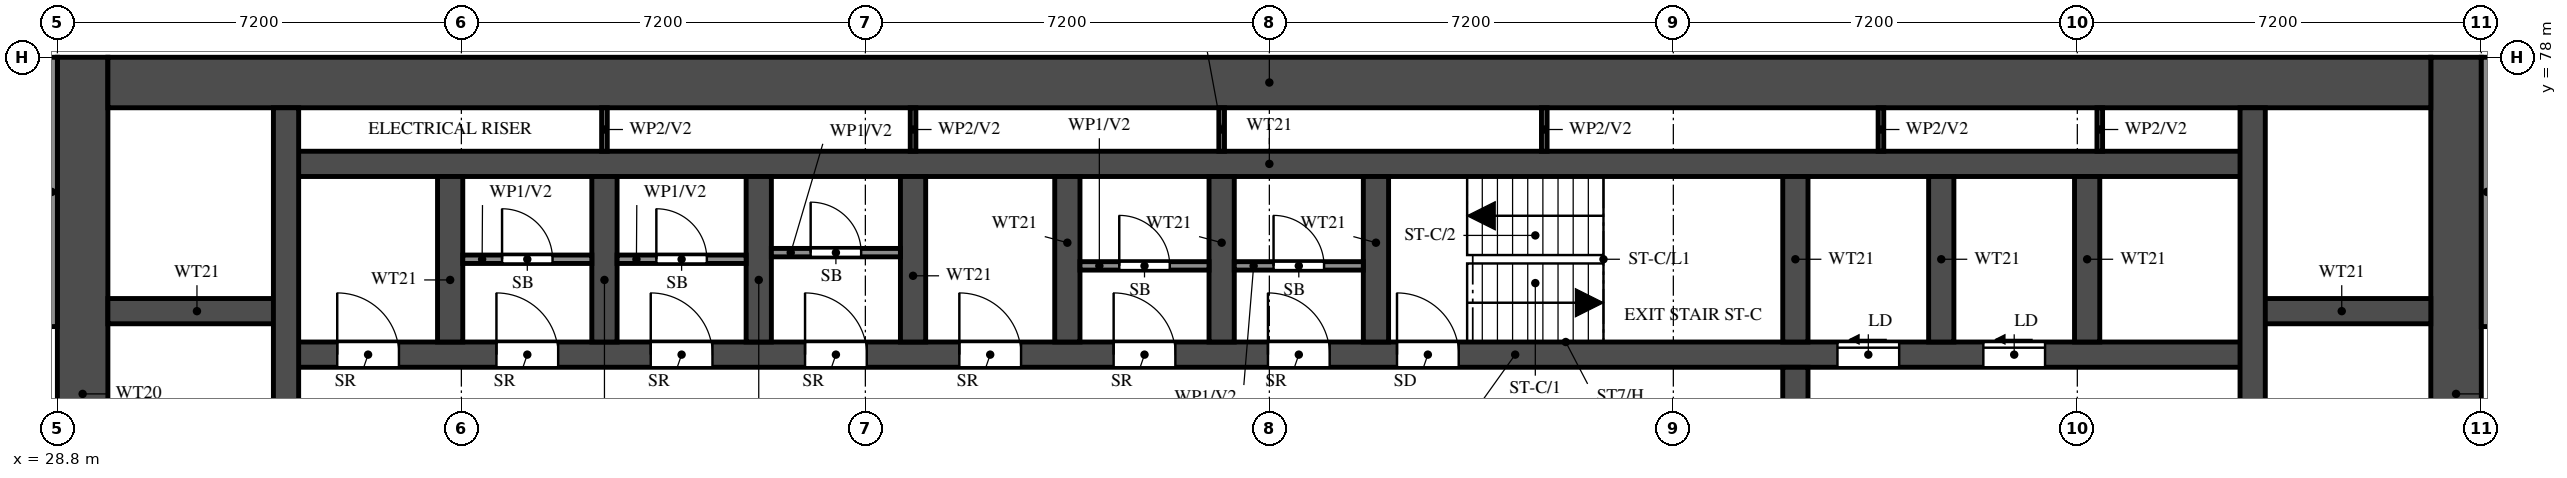
"""IFC4 building model, lengths in metres.
Left out: names, types, materials, properties, quantities, classifications, styles, units other than length and angle.
Written with IfcOpenShell. Run it as: python <this file> out.ifc"""

import sys

from ifc_helpers import new_model, si_unit, direction, frame, frame_2d, origin, place, context, subcontext, project, spatial, rectangle, extrude, element, fill, save


model = new_model("IFC4")
c1 = context("Model", 3, precision=1e-05, world=origin(), true_north=direction((0.0, 1.0)))
c2 = subcontext(c1, "Body", "Model", "MODEL_VIEW")
j1 = project(units=[si_unit("LENGTHUNIT", "METRE"), si_unit("PLANEANGLEUNIT", "RADIAN")], contexts=[c1])
p1 = place(None, origin())
s1 = spatial("IfcSite", under=j1, at=p1, CompositionType="ELEMENT")
p2 = place(p1, origin())
s2 = spatial("IfcBuilding", under=s1, at=p2, CompositionType="ELEMENT")
p3 = place(p2, frame((0.0, 0.0, 93.5)))
s3 = spatial("IfcBuildingStorey", under=s2, at=p3, CompositionType="ELEMENT", Elevation=93.5)
for number, where, z_axis, x_axis in (
    (1, (29.25, 66.0, 0.0), (0.0, 0.0, 1.0), (0.0, 1.0, 0.0)),
    (2, (71.55, 66.0, 0.0), (0.0, 0.0, 1.0), (0.0, 1.0, 0.0)),
):
    element("IfcWall", number, at=place(p3, frame(where, z_axis=z_axis, x_axis=x_axis)), inside=s3, PredefinedType="SHEAR", context=c2, shape_type="SweptSolid", body=[
        extrude(rectangle(XDim=12.0, YDim=0.9, at=frame_2d((6.0, 0.0))), origin(), (0.0, 0.0, 1.0), 3.18),
    ])
p4 = place(p3, frame((29.7, 77.55, 0.0), z_axis=(0.0, 0.0, 1.0), x_axis=(1.0, 0.0, 0.0)))
e3 = element("IfcWall", 3, at=p4, inside=s3, PredefinedType="SHEAR", context=c2, shape_type="SweptSolid", body=[
    extrude(rectangle(XDim=41.4, YDim=0.9, at=frame_2d((20.7, 0.0))), origin(), (0.0, 0.0, 1.0), 3.18),
])
p5 = place(p3, frame((32.875, 72.7, 0.0), z_axis=(0.0, 0.0, 1.0), x_axis=(1.0, 0.0, 0.0)))
e4 = element("IfcWall", 4, at=p5, inside=s3, PredefinedType="SHEAR", context=c2, shape_type="SweptSolid", body=[
    extrude(rectangle(XDim=35.05, YDim=0.45, at=frame_2d((17.525, 0.0))), origin(), (0.0, 0.0, 1.0), 3.18),
])
p6 = place(p5, frame((19.8, 0.0, 0.0)))
e5 = element("IfcOpeningElement", 5, at=p6, cuts=e4, PredefinedType="OPENING", context=c2, shape_type="SweptSolid", body=[
    extrude(rectangle(XDim=1.1, YDim=2.1, at=frame_2d((0.55, 1.05))), frame((0.0, 0.235, 0.0), z_axis=(0.0, -1.0, 0.0), x_axis=(1.0, 0.0, 0.0)), (0.0, 0.0, 1.0), 0.47),
])
p7 = place(p5, frame((27.65, 0.0, 0.0)))
e6 = element("IfcOpeningElement", 6, at=p7, cuts=e4, PredefinedType="OPENING", context=c2, shape_type="SweptSolid", body=[
    extrude(rectangle(XDim=1.1, YDim=2.1, at=frame_2d((0.55, 1.05))), frame((0.0, 0.235, 0.0), z_axis=(0.0, -1.0, 0.0), x_axis=(1.0, 0.0, 0.0)), (0.0, 0.0, 1.0), 0.47),
])
p8 = place(p5, frame((30.25, 0.0, 0.0)))
e7 = element("IfcOpeningElement", 7, at=p8, cuts=e4, PredefinedType="OPENING", context=c2, shape_type="SweptSolid", body=[
    extrude(rectangle(XDim=1.1, YDim=2.1, at=frame_2d((0.55, 1.05))), frame((0.0, 0.235, 0.0), z_axis=(0.0, -1.0, 0.0), x_axis=(1.0, 0.0, 0.0)), (0.0, 0.0, 1.0), 0.47),
])
p9 = place(p5, frame((3.75, 0.0, 0.0)))
e8 = element("IfcOpeningElement", 8, at=p9, cuts=e4, PredefinedType="OPENING", context=c2, shape_type="SweptSolid", body=[
    extrude(rectangle(XDim=1.1, YDim=2.1, at=frame_2d((0.55, 1.05))), frame((0.0, 0.235, 0.0), z_axis=(0.0, -1.0, 0.0), x_axis=(1.0, 0.0, 0.0)), (0.0, 0.0, 1.0), 0.47),
])
p10 = place(p5, frame((6.5, 0.0, 0.0)))
e9 = element("IfcOpeningElement", 9, at=p10, cuts=e4, PredefinedType="OPENING", context=c2, shape_type="SweptSolid", body=[
    extrude(rectangle(XDim=1.1, YDim=2.1, at=frame_2d((0.55, 1.05))), frame((0.0, 0.235, 0.0), z_axis=(0.0, -1.0, 0.0), x_axis=(1.0, 0.0, 0.0)), (0.0, 0.0, 1.0), 0.47),
])
p11 = place(p5, frame((9.25, 0.0, 0.0)))
e10 = element("IfcOpeningElement", 10, at=p11, cuts=e4, PredefinedType="OPENING", context=c2, shape_type="SweptSolid", body=[
    extrude(rectangle(XDim=1.1, YDim=2.1, at=frame_2d((0.55, 1.05))), frame((0.0, 0.235, 0.0), z_axis=(0.0, -1.0, 0.0), x_axis=(1.0, 0.0, 0.0)), (0.0, 0.0, 1.0), 0.47),
])
p12 = place(p5, frame((12.0, 0.0, 0.0)))
e11 = element("IfcOpeningElement", 11, at=p12, cuts=e4, PredefinedType="OPENING", context=c2, shape_type="SweptSolid", body=[
    extrude(rectangle(XDim=1.1, YDim=2.1, at=frame_2d((0.55, 1.05))), frame((0.0, 0.235, 0.0), z_axis=(0.0, -1.0, 0.0), x_axis=(1.0, 0.0, 0.0)), (0.0, 0.0, 1.0), 0.47),
])
p13 = place(p5, frame((14.75, 0.0, 0.0)))
e12 = element("IfcOpeningElement", 12, at=p13, cuts=e4, PredefinedType="OPENING", context=c2, shape_type="SweptSolid", body=[
    extrude(rectangle(XDim=1.1, YDim=2.1, at=frame_2d((0.55, 1.05))), frame((0.0, 0.235, 0.0), z_axis=(0.0, -1.0, 0.0), x_axis=(1.0, 0.0, 0.0)), (0.0, 0.0, 1.0), 0.47),
])
p14 = place(p5, frame((17.5, 0.0, 0.0)))
e13 = element("IfcOpeningElement", 13, at=p14, cuts=e4, PredefinedType="OPENING", context=c2, shape_type="SweptSolid", body=[
    extrude(rectangle(XDim=1.1, YDim=2.1, at=frame_2d((0.55, 1.05))), frame((0.0, 0.235, 0.0), z_axis=(0.0, -1.0, 0.0), x_axis=(1.0, 0.0, 0.0)), (0.0, 0.0, 1.0), 0.47),
])
p15 = place(p5, frame((0.913, 0.0, 0.0)))
e14 = element("IfcOpeningElement", 14, at=p15, cuts=e4, PredefinedType="OPENING", context=c2, shape_type="SweptSolid", body=[
    extrude(rectangle(XDim=1.1, YDim=2.1, at=frame_2d((0.55, 1.05))), frame((0.0, 0.235, 0.0), z_axis=(0.0, -1.0, 0.0), x_axis=(1.0, 0.0, 0.0)), (0.0, 0.0, 1.0), 0.47),
])
p16 = place(p3, frame((32.875, 76.1, 0.0), z_axis=(0.0, 0.0, 1.0), x_axis=(1.0, 0.0, 0.0)))
e15 = element("IfcWall", 15, at=p16, inside=s3, PredefinedType="SHEAR", context=c2, shape_type="SweptSolid", body=[
    extrude(rectangle(XDim=35.05, YDim=0.45, at=frame_2d((17.525, 0.0))), origin(), (0.0, 0.0, 1.0), 3.18),
])
for number, where, z_axis, x_axis in (
    (16, (29.7, 73.475, 0.0), (0.0, 0.0, 1.0), (1.0, 0.0, 0.0)),
    (17, (67.925, 73.475, 0.0), (0.0, 0.0, 1.0), (1.0, 0.0, 0.0)),
):
    element("IfcWall", number, at=place(p3, frame(where, z_axis=z_axis, x_axis=x_axis)), inside=s3, PredefinedType="SHEAR", context=c2, shape_type="SweptSolid", body=[
        extrude(rectangle(XDim=3.175, YDim=0.45, at=frame_2d((1.587, 0.0))), origin(), (0.0, 0.0, 1.0), 3.18),
    ])
p17 = place(p3, frame((32.875, 66.45, 0.0), z_axis=(0.0, 0.0, 1.0), x_axis=(0.0, 1.0, 0.0)))
e18 = element("IfcWall", 18, at=p17, inside=s3, PredefinedType="SHEAR", context=c2, shape_type="SweptSolid", body=[
    extrude(rectangle(XDim=10.65, YDim=0.45, at=frame_2d((5.325, 0.0))), origin(), (0.0, 0.0, 1.0), 3.18),
])
p18 = place(p3, frame((67.925, 66.45, 0.0), z_axis=(0.0, 0.0, 1.0), x_axis=(0.0, 1.0, 0.0)))
e19 = element("IfcWall", 19, at=p18, inside=s3, PredefinedType="SHEAR", context=c2, shape_type="SweptSolid", body=[
    extrude(rectangle(XDim=10.65, YDim=0.45, at=frame_2d((5.325, 0.0))), origin(), (0.0, 0.0, 1.0), 3.18),
])
p19 = place(p18, frame((0.15, 0.0, 0.0)))
e20 = element("IfcOpeningElement", 20, at=p19, cuts=e19, PredefinedType="OPENING", context=c2, shape_type="SweptSolid", body=[
    extrude(rectangle(XDim=1.1, YDim=2.1, at=frame_2d((0.55, 1.05))), frame((0.0, 0.235, 0.0), z_axis=(0.0, -1.0, 0.0), x_axis=(1.0, 0.0, 0.0)), (0.0, 0.0, 1.0), 0.47),
])
p20 = place(p3, frame((59.775, 66.45, 0.0), z_axis=(0.0, 0.0, 1.0), x_axis=(0.0, 1.0, 0.0)))
e21 = element("IfcWall", 21, at=p20, inside=s3, PredefinedType="SHEAR", context=c2, shape_type="SweptSolid", body=[
    extrude(rectangle(XDim=6.025, YDim=0.45, at=frame_2d((3.013, 0.0))), origin(), (0.0, 0.0, 1.0), 3.18),
])
p21 = place(p20, frame((3.85, 0.0, 0.0)))
e22 = element("IfcOpeningElement", 22, at=p21, cuts=e21, PredefinedType="OPENING", context=c2, shape_type="SweptSolid", body=[
    extrude(rectangle(XDim=1.2, YDim=2.1, at=frame_2d((0.6, 1.05))), frame((0.0, 0.235, 0.0), z_axis=(0.0, -1.0, 0.0), x_axis=(1.0, 0.0, 0.0)), (0.0, 0.0, 1.0), 0.47),
])
for number, where, z_axis, x_axis in (
    (23, (59.775, 72.925, 0.0), (0.0, 0.0, 1.0), (0.0, 1.0, 0.0)),
    (24, (35.8, 72.925, 0.0), (0.0, 0.0, 1.0), (0.0, 1.0, 0.0)),
    (25, (38.55, 72.925, 0.0), (0.0, 0.0, 1.0), (0.0, 1.0, 0.0)),
    (26, (41.3, 72.925, 0.0), (0.0, 0.0, 1.0), (0.0, 1.0, 0.0)),
    (27, (44.05, 72.925, 0.0), (0.0, 0.0, 1.0), (0.0, 1.0, 0.0)),
    (28, (46.8, 72.925, 0.0), (0.0, 0.0, 1.0), (0.0, 1.0, 0.0)),
    (29, (49.55, 72.925, 0.0), (0.0, 0.0, 1.0), (0.0, 1.0, 0.0)),
    (30, (52.3, 72.925, 0.0), (0.0, 0.0, 1.0), (0.0, 1.0, 0.0)),
    (31, (62.375, 72.925, 0.0), (0.0, 0.0, 1.0), (0.0, 1.0, 0.0)),
    (32, (64.975, 72.925, 0.0), (0.0, 0.0, 1.0), (0.0, 1.0, 0.0)),
):
    element("IfcWall", number, at=place(p3, frame(where, z_axis=z_axis, x_axis=x_axis)), inside=s3, PredefinedType="SHEAR", context=c2, shape_type="SweptSolid", body=[
        extrude(rectangle(XDim=2.95, YDim=0.45, at=frame_2d((1.475, 0.0))), origin(), (0.0, 0.0, 1.0), 3.18),
    ])
p22 = place(p3, frame((36.025, 74.4, 0.0), z_axis=(0.0, 0.0, 1.0), x_axis=(1.0, 0.0, 0.0)))
e33 = element("IfcWall", 33, at=p22, inside=s3, PredefinedType="PARTITIONING", context=c2, shape_type="SweptSolid", body=[
    extrude(rectangle(XDim=2.3, YDim=0.15, at=frame_2d((1.15, 0.0))), origin(), (0.0, 0.0, 1.0), 3.18),
])
p23 = place(p22, frame((0.7, 0.0, 0.0)))
e34 = element("IfcOpeningElement", 34, at=p23, cuts=e33, PredefinedType="OPENING", context=c2, shape_type="SweptSolid", body=[
    extrude(rectangle(XDim=0.9, YDim=2.1, at=frame_2d((0.45, 1.05))), frame((0.0, 0.085, 0.0), z_axis=(0.0, -1.0, 0.0), x_axis=(1.0, 0.0, 0.0)), (0.0, 0.0, 1.0), 0.17),
])
p24 = place(p3, frame((38.775, 74.4, 0.0), z_axis=(0.0, 0.0, 1.0), x_axis=(1.0, 0.0, 0.0)))
e35 = element("IfcWall", 35, at=p24, inside=s3, PredefinedType="PARTITIONING", context=c2, shape_type="SweptSolid", body=[
    extrude(rectangle(XDim=2.3, YDim=0.15, at=frame_2d((1.15, 0.0))), origin(), (0.0, 0.0, 1.0), 3.18),
])
p25 = place(p24, frame((0.7, 0.0, 0.0)))
e36 = element("IfcOpeningElement", 36, at=p25, cuts=e35, PredefinedType="OPENING", context=c2, shape_type="SweptSolid", body=[
    extrude(rectangle(XDim=0.9, YDim=2.1, at=frame_2d((0.45, 1.05))), frame((0.0, 0.085, 0.0), z_axis=(0.0, -1.0, 0.0), x_axis=(1.0, 0.0, 0.0)), (0.0, 0.0, 1.0), 0.17),
])
p26 = place(p3, frame((41.525, 74.518, 0.0), z_axis=(0.0, 0.0, 1.0), x_axis=(1.0, 0.0, 0.0)))
e37 = element("IfcWall", 37, at=p26, inside=s3, PredefinedType="PARTITIONING", context=c2, shape_type="SweptSolid", body=[
    extrude(rectangle(XDim=2.3, YDim=0.15, at=frame_2d((1.15, 0.0))), origin(), (0.0, 0.0, 1.0), 3.18),
])
p27 = place(p26, frame((0.7, 0.0, 0.0)))
e38 = element("IfcOpeningElement", 38, at=p27, cuts=e37, PredefinedType="OPENING", context=c2, shape_type="SweptSolid", body=[
    extrude(rectangle(XDim=0.9, YDim=2.1, at=frame_2d((0.45, 1.05))), frame((0.0, 0.085, 0.0), z_axis=(0.0, -1.0, 0.0), x_axis=(1.0, 0.0, 0.0)), (0.0, 0.0, 1.0), 0.17),
])
p28 = place(p3, frame((47.025, 74.282, 0.0), z_axis=(0.0, 0.0, 1.0), x_axis=(1.0, 0.0, 0.0)))
e39 = element("IfcWall", 39, at=p28, inside=s3, PredefinedType="PARTITIONING", context=c2, shape_type="SweptSolid", body=[
    extrude(rectangle(XDim=2.3, YDim=0.15, at=frame_2d((1.15, 0.0))), origin(), (0.0, 0.0, 1.0), 3.18),
])
p29 = place(p28, frame((0.7, 0.0, 0.0)))
e40 = element("IfcOpeningElement", 40, at=p29, cuts=e39, PredefinedType="OPENING", context=c2, shape_type="SweptSolid", body=[
    extrude(rectangle(XDim=0.9, YDim=2.1, at=frame_2d((0.45, 1.05))), frame((0.0, 0.085, 0.0), z_axis=(0.0, -1.0, 0.0), x_axis=(1.0, 0.0, 0.0)), (0.0, 0.0, 1.0), 0.17),
])
p30 = place(p3, frame((49.775, 74.282, 0.0), z_axis=(0.0, 0.0, 1.0), x_axis=(1.0, 0.0, 0.0)))
e41 = element("IfcWall", 41, at=p30, inside=s3, PredefinedType="PARTITIONING", context=c2, shape_type="SweptSolid", body=[
    extrude(rectangle(XDim=2.3, YDim=0.15, at=frame_2d((1.15, 0.0))), origin(), (0.0, 0.0, 1.0), 3.18),
])
p31 = place(p30, frame((0.7, 0.0, 0.0)))
e42 = element("IfcOpeningElement", 42, at=p31, cuts=e41, PredefinedType="OPENING", context=c2, shape_type="SweptSolid", body=[
    extrude(rectangle(XDim=0.9, YDim=2.1, at=frame_2d((0.45, 1.05))), frame((0.0, 0.085, 0.0), z_axis=(0.0, -1.0, 0.0), x_axis=(1.0, 0.0, 0.0)), (0.0, 0.0, 1.0), 0.17),
])
for number, where, z_axis, x_axis in (
    (43, (38.55, 76.325, 0.0), (0.0, 0.0, 1.0), (0.0, 1.0, 0.0)),
    (44, (44.05, 76.325, 0.0), (0.0, 0.0, 1.0), (0.0, 1.0, 0.0)),
    (45, (49.55, 76.325, 0.0), (0.0, 0.0, 1.0), (0.0, 1.0, 0.0)),
    (46, (55.3, 76.325, 0.0), (0.0, 0.0, 1.0), (0.0, 1.0, 0.0)),
    (47, (61.3, 76.325, 0.0), (0.0, 0.0, 1.0), (0.0, 1.0, 0.0)),
    (48, (65.2, 76.325, 0.0), (0.0, 0.0, 1.0), (0.0, 1.0, 0.0)),
):
    element("IfcWall", number, at=place(p3, frame(where, z_axis=z_axis, x_axis=x_axis)), inside=s3, PredefinedType="PARTITIONING", context=c2, shape_type="SweptSolid", body=[
        extrude(rectangle(XDim=0.775, YDim=0.1, at=frame_2d((0.388, 0.0))), origin(), (0.0, 0.0, 1.0), 3.18),
    ])
for number, where, z_axis, x_axis in (
    (49, (28.7, 73.2, 0.0), (0.0, 0.0, 1.0), (0.0, 1.0, 0.0)),
    (50, (72.1, 73.2, 0.0), (0.0, 0.0, 1.0), (0.0, 1.0, 0.0)),
):
    element("IfcWall", number, at=place(p3, frame(where, z_axis=z_axis, x_axis=x_axis)), inside=s3, PredefinedType="SOLIDWALL", context=c2, shape_type="SweptSolid", body=[
        extrude(rectangle(XDim=4.8, YDim=0.2, at=frame_2d((2.4, 0.0))), origin(), (0.0, 0.0, 1.0), 3.18),
    ])
p32 = place(p6, origin())
e51 = element("IfcDoor", 51, at=p32, inside=s3, OperationType="SINGLE_SWING_LEFT", PredefinedType="DOOR", context=c2, shape_type="SweptSolid", body=[
    extrude(rectangle(XDim=1.1, YDim=2.1, at=frame_2d((0.55, 1.05))), frame((0.0, 0.025, 0.0), z_axis=(0.0, -1.0, 0.0), x_axis=(1.0, 0.0, 0.0)), (0.0, 0.0, 1.0), 0.05),
])
fill(e5, e51)
p33 = place(p7, origin())
e52 = element("IfcDoor", 52, at=p33, inside=s3, OperationType="SLIDING_TO_LEFT", PredefinedType="DOOR", context=c2, shape_type="SweptSolid", body=[
    extrude(rectangle(XDim=1.1, YDim=2.1, at=frame_2d((0.55, 1.05))), frame((0.0, 0.025, 0.0), z_axis=(0.0, -1.0, 0.0), x_axis=(1.0, 0.0, 0.0)), (0.0, 0.0, 1.0), 0.05),
])
fill(e6, e52)
p34 = place(p8, origin())
e53 = element("IfcDoor", 53, at=p34, inside=s3, OperationType="SLIDING_TO_LEFT", PredefinedType="DOOR", context=c2, shape_type="SweptSolid", body=[
    extrude(rectangle(XDim=1.1, YDim=2.1, at=frame_2d((0.55, 1.05))), frame((0.0, 0.025, 0.0), z_axis=(0.0, -1.0, 0.0), x_axis=(1.0, 0.0, 0.0)), (0.0, 0.0, 1.0), 0.05),
])
fill(e7, e53)
p35 = place(p9, origin())
e54 = element("IfcDoor", 54, at=p35, inside=s3, OperationType="SINGLE_SWING_LEFT", PredefinedType="DOOR", context=c2, shape_type="SweptSolid", body=[
    extrude(rectangle(XDim=1.1, YDim=2.1, at=frame_2d((0.55, 1.05))), frame((0.0, 0.025, 0.0), z_axis=(0.0, -1.0, 0.0), x_axis=(1.0, 0.0, 0.0)), (0.0, 0.0, 1.0), 0.05),
])
fill(e8, e54)
p36 = place(p23, origin())
e55 = element("IfcDoor", 55, at=p36, inside=s3, OperationType="SINGLE_SWING_LEFT", PredefinedType="DOOR", context=c2, shape_type="SweptSolid", body=[
    extrude(rectangle(XDim=0.9, YDim=2.1, at=frame_2d((0.45, 1.05))), frame((0.0, 0.025, 0.0), z_axis=(0.0, -1.0, 0.0), x_axis=(1.0, 0.0, 0.0)), (0.0, 0.0, 1.0), 0.05),
])
fill(e34, e55)
p37 = place(p10, origin())
e56 = element("IfcDoor", 56, at=p37, inside=s3, OperationType="SINGLE_SWING_LEFT", PredefinedType="DOOR", context=c2, shape_type="SweptSolid", body=[
    extrude(rectangle(XDim=1.1, YDim=2.1, at=frame_2d((0.55, 1.05))), frame((0.0, 0.025, 0.0), z_axis=(0.0, -1.0, 0.0), x_axis=(1.0, 0.0, 0.0)), (0.0, 0.0, 1.0), 0.05),
])
fill(e9, e56)
p38 = place(p25, origin())
e57 = element("IfcDoor", 57, at=p38, inside=s3, OperationType="SINGLE_SWING_RIGHT", PredefinedType="DOOR", context=c2, shape_type="SweptSolid", body=[
    extrude(rectangle(XDim=0.9, YDim=2.1, at=frame_2d((0.45, 1.05))), frame((0.0, 0.025, 0.0), z_axis=(0.0, -1.0, 0.0), x_axis=(1.0, 0.0, 0.0)), (0.0, 0.0, 1.0), 0.05),
])
fill(e36, e57)
p39 = place(p11, origin())
e58 = element("IfcDoor", 58, at=p39, inside=s3, OperationType="SINGLE_SWING_LEFT", PredefinedType="DOOR", context=c2, shape_type="SweptSolid", body=[
    extrude(rectangle(XDim=1.1, YDim=2.1, at=frame_2d((0.55, 1.05))), frame((0.0, 0.025, 0.0), z_axis=(0.0, -1.0, 0.0), x_axis=(1.0, 0.0, 0.0)), (0.0, 0.0, 1.0), 0.05),
])
fill(e10, e58)
p40 = place(p27, origin())
e59 = element("IfcDoor", 59, at=p40, inside=s3, OperationType="SINGLE_SWING_RIGHT", PredefinedType="DOOR", context=c2, shape_type="SweptSolid", body=[
    extrude(rectangle(XDim=0.9, YDim=2.1, at=frame_2d((0.45, 1.05))), frame((0.0, 0.025, 0.0), z_axis=(0.0, -1.0, 0.0), x_axis=(1.0, 0.0, 0.0)), (0.0, 0.0, 1.0), 0.05),
])
fill(e38, e59)
p41 = place(p12, origin())
e60 = element("IfcDoor", 60, at=p41, inside=s3, OperationType="SINGLE_SWING_LEFT", PredefinedType="DOOR", context=c2, shape_type="SweptSolid", body=[
    extrude(rectangle(XDim=1.1, YDim=2.1, at=frame_2d((0.55, 1.05))), frame((0.0, 0.025, 0.0), z_axis=(0.0, -1.0, 0.0), x_axis=(1.0, 0.0, 0.0)), (0.0, 0.0, 1.0), 0.05),
])
fill(e11, e60)
p42 = place(p13, origin())
e61 = element("IfcDoor", 61, at=p42, inside=s3, OperationType="SINGLE_SWING_LEFT", PredefinedType="DOOR", context=c2, shape_type="SweptSolid", body=[
    extrude(rectangle(XDim=1.1, YDim=2.1, at=frame_2d((0.55, 1.05))), frame((0.0, 0.025, 0.0), z_axis=(0.0, -1.0, 0.0), x_axis=(1.0, 0.0, 0.0)), (0.0, 0.0, 1.0), 0.05),
])
fill(e12, e61)
p43 = place(p29, origin())
e62 = element("IfcDoor", 62, at=p43, inside=s3, OperationType="SINGLE_SWING_LEFT", PredefinedType="DOOR", context=c2, shape_type="SweptSolid", body=[
    extrude(rectangle(XDim=0.9, YDim=2.1, at=frame_2d((0.45, 1.05))), frame((0.0, 0.025, 0.0), z_axis=(0.0, -1.0, 0.0), x_axis=(1.0, 0.0, 0.0)), (0.0, 0.0, 1.0), 0.05),
])
fill(e40, e62)
p44 = place(p14, origin())
e63 = element("IfcDoor", 63, at=p44, inside=s3, OperationType="SINGLE_SWING_LEFT", PredefinedType="DOOR", context=c2, shape_type="SweptSolid", body=[
    extrude(rectangle(XDim=1.1, YDim=2.1, at=frame_2d((0.55, 1.05))), frame((0.0, 0.025, 0.0), z_axis=(0.0, -1.0, 0.0), x_axis=(1.0, 0.0, 0.0)), (0.0, 0.0, 1.0), 0.05),
])
fill(e13, e63)
p45 = place(p31, origin())
e64 = element("IfcDoor", 64, at=p45, inside=s3, OperationType="SINGLE_SWING_RIGHT", PredefinedType="DOOR", context=c2, shape_type="SweptSolid", body=[
    extrude(rectangle(XDim=0.9, YDim=2.1, at=frame_2d((0.45, 1.05))), frame((0.0, 0.025, 0.0), z_axis=(0.0, -1.0, 0.0), x_axis=(1.0, 0.0, 0.0)), (0.0, 0.0, 1.0), 0.05),
])
fill(e42, e64)
p46 = place(p15, origin())
e65 = element("IfcDoor", 65, at=p46, inside=s3, OperationType="SINGLE_SWING_LEFT", PredefinedType="DOOR", context=c2, shape_type="SweptSolid", body=[
    extrude(rectangle(XDim=1.1, YDim=2.1, at=frame_2d((0.55, 1.05))), frame((0.0, 0.025, 0.0), z_axis=(0.0, -1.0, 0.0), x_axis=(1.0, 0.0, 0.0)), (0.0, 0.0, 1.0), 0.05),
])
fill(e14, e65)
save(model, sys.argv[1])
